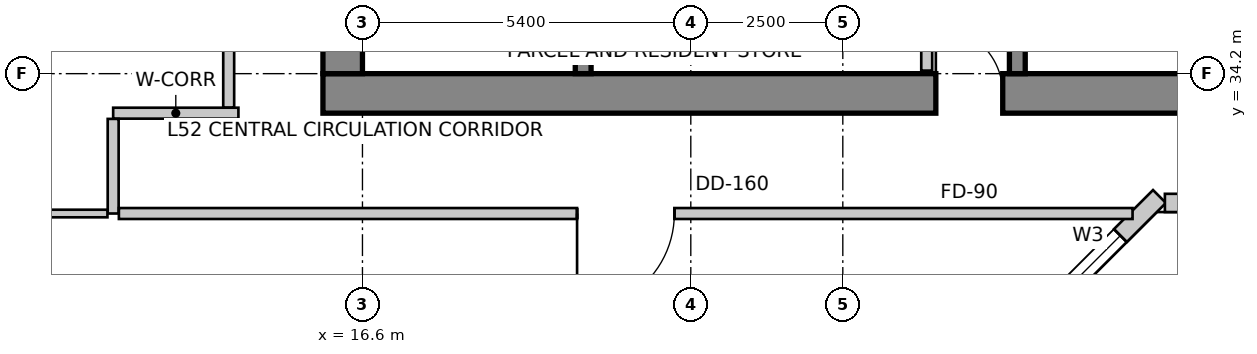
"""IFC4 building model, lengths in metres.
Left out: names, types, materials, properties, quantities, classifications, styles, units other than length and angle.
Written with IfcOpenShell. Run it as: python <this file> out.ifc"""

import sys

from ifc_helpers import new_model, si_unit, direction, frame, frame_2d, origin, place, context, subcontext, project, spatial, rectangle, extrude, source, transform, mapped, element, fill, save


model = new_model("IFC4")
c1 = context("Model", 3, precision=1e-05, world=origin(), true_north=direction((0.0, 1.0)))
c2 = subcontext(c1, "Body", "Model", "MODEL_VIEW")
j1 = project(units=[si_unit("LENGTHUNIT", "METRE"), si_unit("PLANEANGLEUNIT", "RADIAN")], contexts=[c1])
p1 = place(None, origin())
s1 = spatial("IfcSite", under=j1, at=p1, CompositionType="ELEMENT")
p2 = place(p1, origin())
s2 = spatial("IfcBuilding", under=s1, at=p2, CompositionType="ELEMENT")
p3 = place(p2, frame((0.0, 0.0, 207.9)))
s3 = spatial("IfcBuildingStorey", under=s2, at=p3, CompositionType="ELEMENT", Elevation=207.9)
p4 = place(p3, frame((15.95, 33.875, 0.0), z_axis=(0.0, 0.0, 1.0), x_axis=(1.0, 0.0, 0.0)))
e1 = element("IfcWall", 1, at=p4, inside=s3, PredefinedType="SHEAR", context=c2, shape_type="SweptSolid", body=[
    extrude(rectangle(XDim=15.7, YDim=0.65, at=frame_2d((7.85, 0.0))), origin(), (0.0, 0.0, 1.0), 3.5),
])
m1 = source(origin(), c2, "Body", "SweptSolid", [
    extrude(rectangle(XDim=1.1, YDim=2.15, at=frame_2d((0.55, 1.075))), frame((0.0, 0.335, 0.0), z_axis=(0.0, -1.0, 0.0), x_axis=(1.0, 0.0, 0.0)), (0.0, 0.0, 1.0), 0.67),
])
p5 = place(p4, frame((10.08, 0.0, 0.0)))
e2 = element("IfcOpeningElement", 2, at=p5, cuts=e1, PredefinedType="OPENING", context=c2, shape_type="MappedRepresentation", body=[
    mapped(m1, transform((0.0, 0.0, 0.0), scale=1.0)),
])
p6 = place(p3, frame((16.275, 34.2, 0.0), z_axis=(0.0, 0.0, 1.0), x_axis=(0.0, 1.0, 0.0)))
e3 = element("IfcWall", 3, at=p6, inside=s3, PredefinedType="SHEAR", context=c2, shape_type="SweptSolid", body=[
    extrude(rectangle(XDim=11.4, YDim=0.65, at=frame_2d((5.7, 0.0))), origin(), (0.0, 0.0, 1.0), 3.5),
])
p7 = place(p6, frame((7.15, 0.0, 0.0)))
e4 = element("IfcOpeningElement", 4, at=p7, cuts=e3, PredefinedType="OPENING", context=c2, shape_type="MappedRepresentation", body=[
    mapped(m1, transform((0.0, 0.0, 0.0), scale=1.0)),
])
p8 = place(p3, frame((20.23, 34.2, 0.0), z_axis=(0.0, 0.0, 1.0), x_axis=(0.0, 1.0, 0.0)))
e5 = element("IfcWall", 5, at=p8, inside=s3, PredefinedType="SHEAR", context=c2, shape_type="SweptSolid", body=[
    extrude(rectangle(XDim=9.06, YDim=0.26, at=frame_2d((4.53, 0.0))), origin(), (0.0, 0.0, 1.0), 3.5),
])
m2 = source(origin(), c2, "Body", "SweptSolid", [
    extrude(rectangle(XDim=1.1, YDim=2.15, at=frame_2d((0.55, 1.075))), frame((0.0, 0.14, 0.0), z_axis=(0.0, -1.0, 0.0), x_axis=(1.0, 0.0, 0.0)), (0.0, 0.0, 1.0), 0.28),
])
p9 = place(p8, frame((7.45, 0.0, 0.0)))
e6 = element("IfcOpeningElement", 6, at=p9, cuts=e5, PredefinedType="OPENING", context=c2, shape_type="MappedRepresentation", body=[
    mapped(m2, transform((0.0, 0.0, 0.0), scale=1.0)),
])
p10 = place(p3, frame((27.37, 34.2, 0.0), z_axis=(0.0, 0.0, 1.0), x_axis=(0.0, 1.0, 0.0)))
e7 = element("IfcWall", 7, at=p10, inside=s3, PredefinedType="SHEAR", context=c2, shape_type="SweptSolid", body=[
    extrude(rectangle(XDim=9.06, YDim=0.26, at=frame_2d((4.53, 0.0))), origin(), (0.0, 0.0, 1.0), 3.5),
])
p11 = place(p10, frame((7.45, 0.0, 0.0)))
e8 = element("IfcOpeningElement", 8, at=p11, cuts=e7, PredefinedType="OPENING", context=c2, shape_type="MappedRepresentation", body=[
    mapped(m2, transform((0.0, 0.0, 0.0), scale=1.0)),
])
p12 = place(p3, frame((27.652, 30.124, 0.0), z_axis=(0.0, 0.0, 1.0), x_axis=(0.707064797706, 0.707148762175, 0.0)))
e9 = element("IfcWall", 9, at=p12, inside=s3, PredefinedType="SOLIDWALL", context=c2, shape_type="SweptSolid", body=[
    extrude(rectangle(XDim=2.908, YDim=0.3, at=frame_2d((1.454, 0.0))), origin(), (0.0, 0.0, 1.0), 3.2),
])
m3 = source(origin(), c2, "Body", "SweptSolid", [
    extrude(rectangle(XDim=1.5, YDim=1.8, at=frame_2d((0.75, 0.9))), frame((0.0, 0.16, 0.0), z_axis=(0.0, -1.0, 0.0), x_axis=(1.0, 0.0, 0.0)), (0.0, 0.0, 1.0), 0.32),
])
p13 = place(p12, frame((0.498, 0.0, 0.85)))
e10 = element("IfcOpeningElement", 10, at=p13, cuts=e9, PredefinedType="OPENING", context=c2, shape_type="MappedRepresentation", body=[
    mapped(m3, transform((0.0, 0.0, 0.0), scale=1.0)),
])
p14 = place(p3, frame((29.797, 32.074, 0.0), z_axis=(0.0, 0.0, 1.0), x_axis=(1.0, 0.0, 0.0)))
e11 = element("IfcWall", 11, at=p14, inside=s3, PredefinedType="SOLIDWALL", context=c2, shape_type="SweptSolid", body=[
    extrude(rectangle(XDim=0.882, YDim=0.3, at=frame_2d((0.441, 0.0))), origin(), (0.0, 0.0, 1.0), 3.2),
])
p15 = place(p3, frame((13.269, 47.134, 0.0), z_axis=(0.0, 0.0, 1.0), x_axis=(-0.319920776449, -0.947444297464, 0.0)))
e12 = element("IfcWall", 12, at=p15, inside=s3, PredefinedType="SOLIDWALL", context=c2, shape_type="SweptSolid", body=[
    extrude(rectangle(XDim=16.133, YDim=0.3, at=frame_2d((8.067, 0.0))), origin(), (0.0, 0.0, 1.0), 3.2),
])
m4 = source(origin(), c2, "Body", "SweptSolid", [
    extrude(rectangle(XDim=2.4, YDim=2.2, at=frame_2d((1.2, 1.1))), frame((0.0, 0.16, 0.0), z_axis=(0.0, -1.0, 0.0), x_axis=(1.0, 0.0, 0.0)), (0.0, 0.0, 1.0), 0.32),
])
p16 = place(p15, frame((2.363, 0.0, 0.85)))
e13 = element("IfcOpeningElement", 13, at=p16, cuts=e12, PredefinedType="OPENING", context=c2, shape_type="MappedRepresentation", body=[
    mapped(m4, transform((0.0, 0.0, 0.0), scale=1.0)),
])
m5 = source(origin(), c2, "Body", "SweptSolid", [
    extrude(rectangle(XDim=2.1, YDim=2.0, at=frame_2d((1.05, 1.0))), frame((0.0, 0.16, 0.0), z_axis=(0.0, -1.0, 0.0), x_axis=(1.0, 0.0, 0.0)), (0.0, 0.0, 1.0), 0.32),
])
p17 = place(p15, frame((7.41, 0.0, 0.85)))
e14 = element("IfcOpeningElement", 14, at=p17, cuts=e12, PredefinedType="OPENING", context=c2, shape_type="MappedRepresentation", body=[
    mapped(m5, transform((0.0, 0.0, 0.0), scale=1.0)),
])
p18 = place(p15, frame((12.157, 0.0, 0.85)))
e15 = element("IfcOpeningElement", 15, at=p18, cuts=e12, PredefinedType="OPENING", context=c2, shape_type="MappedRepresentation", body=[
    mapped(m4, transform((0.0, 0.0, 0.0), scale=1.0)),
])
p19 = place(p3, frame((8.188, 31.834, 0.0), z_axis=(0.0, 0.0, 1.0), x_axis=(0.202303475707, -0.979322880217, 0.0)))
e16 = element("IfcWall", 16, at=p19, inside=s3, PredefinedType="SOLIDWALL", context=c2, shape_type="SweptSolid", body=[
    extrude(rectangle(XDim=15.766, YDim=0.3, at=frame_2d((7.883, 0.0))), origin(), (0.0, 0.0, 1.0), 3.2),
])
m6 = source(origin(), c2, "Body", "SweptSolid", [
    extrude(rectangle(XDim=1.6, YDim=2.15, at=frame_2d((0.8, 1.075))), frame((0.0, 0.16, 0.0), z_axis=(0.0, -1.0, 0.0), x_axis=(1.0, 0.0, 0.0)), (0.0, 0.0, 1.0), 0.32),
])
p20 = place(p19, frame((9.466, 0.0, 0.0)))
e17 = element("IfcOpeningElement", 17, at=p20, cuts=e16, PredefinedType="OPENING", context=c2, shape_type="MappedRepresentation", body=[
    mapped(m6, transform((0.0, 0.0, 0.0), scale=1.0)),
])
p21 = place(p19, frame((1.487, 0.0, 0.85)))
e18 = element("IfcOpeningElement", 18, at=p21, cuts=e16, PredefinedType="OPENING", context=c2, shape_type="MappedRepresentation", body=[
    mapped(m5, transform((0.0, 0.0, 0.0), scale=1.0)),
])
p22 = place(p19, frame((5.769, 0.0, 0.85)))
e19 = element("IfcOpeningElement", 19, at=p22, cuts=e16, PredefinedType="OPENING", context=c2, shape_type="MappedRepresentation", body=[
    mapped(m4, transform((0.0, 0.0, 0.0), scale=1.0)),
])
p23 = place(p19, frame((11.588, 0.0, 0.85)))
e20 = element("IfcOpeningElement", 20, at=p23, cuts=e16, PredefinedType="OPENING", context=c2, shape_type="MappedRepresentation", body=[
    mapped(m5, transform((0.0, 0.0, 0.0), scale=1.0)),
])
p24 = place(p3, frame((25.88, 35.956, 0.0), z_axis=(0.0, 0.0, 1.0), x_axis=(0.0, -1.0, 0.0)))
e21 = element("IfcWall", 21, at=p24, inside=s3, PredefinedType="PARTITIONING", context=c2, shape_type="SweptSolid", body=[
    extrude(rectangle(XDim=1.706, YDim=0.18, at=frame_2d((0.853, 0.0))), origin(), (0.0, 0.0, 1.0), 2.492),
])
p25 = place(p3, frame((12.5, 33.55, 0.0), z_axis=(0.0, 0.0, 1.0), x_axis=(1.0, 0.0, 0.0)))
e22 = element("IfcWall", 22, at=p25, inside=s3, PredefinedType="PARTITIONING", context=c2, shape_type="SweptSolid", body=[
    extrude(rectangle(XDim=2.06, YDim=0.18, at=frame_2d((1.03, 0.0))), origin(), (0.0, 0.0, 1.0), 3.2),
])
p26 = place(p3, frame((12.5, 31.9, 0.0), z_axis=(0.0, 0.0, 1.0), x_axis=(0.0, 1.0, 0.0)))
e23 = element("IfcWall", 23, at=p26, inside=s3, PredefinedType="PARTITIONING", context=c2, shape_type="SweptSolid", body=[
    extrude(rectangle(XDim=1.556, YDim=0.18, at=frame_2d((0.778, 0.0))), origin(), (0.0, 0.0, 1.0), 2.869),
])
p27 = place(p3, frame((29.265, 31.9, 0.0), z_axis=(0.0, 0.0, 1.0), x_axis=(-1.0, 0.0, 0.0)))
e24 = element("IfcWall", 24, at=p27, inside=s3, PredefinedType="PARTITIONING", context=c2, shape_type="SweptSolid", body=[
    extrude(rectangle(XDim=16.671, YDim=0.18, at=frame_2d((8.335, 0.0))), origin(), (0.0, 0.0, 1.0), 2.869),
])
m7 = source(origin(), c2, "Body", "SweptSolid", [
    extrude(rectangle(XDim=1.6, YDim=2.15, at=frame_2d((0.8, 1.075))), frame((0.0, 0.1, 0.0), z_axis=(0.0, -1.0, 0.0), x_axis=(1.0, 0.0, 0.0)), (0.0, 0.0, 1.0), 0.2),
])
p28 = place(p27, frame((7.536, 0.0, 0.0)))
e25 = element("IfcOpeningElement", 25, at=p28, cuts=e24, PredefinedType="OPENING", context=c2, shape_type="MappedRepresentation", body=[
    mapped(m7, transform((0.0, 0.0, 0.0), scale=1.0)),
])
p29 = place(p3, frame((14.4, 33.644, 0.0), z_axis=(0.0, 0.0, 1.0), x_axis=(0.0, 1.0, 0.0)))
e26 = element("IfcWall", 26, at=p29, inside=s3, PredefinedType="PARTITIONING", context=c2, shape_type="SweptSolid", body=[
    extrude(rectangle(XDim=12.606, YDim=0.18, at=frame_2d((6.303, 0.0))), origin(), (0.0, 0.0, 1.0), 3.2),
])
m8 = source(origin(), c2, "Body", "SweptSolid", [
    extrude(rectangle(XDim=0.9, YDim=2.15, at=frame_2d((0.45, 1.075))), frame((0.0, 0.1, 0.0), z_axis=(0.0, -1.0, 0.0), x_axis=(1.0, 0.0, 0.0)), (0.0, 0.0, 1.0), 0.2),
])
p30 = place(p29, frame((4.399, 0.0, 0.0)))
e27 = element("IfcOpeningElement", 27, at=p30, cuts=e26, PredefinedType="OPENING", context=c2, shape_type="MappedRepresentation", body=[
    mapped(m8, transform((0.0, 0.0, 0.0), scale=1.0)),
])
p31 = place(p3, frame((12.406, 31.9, 0.0), z_axis=(0.0, 0.0, 1.0), x_axis=(-1.0, 0.0, 0.0)))
e28 = element("IfcWall", 28, at=p31, inside=s3, PredefinedType="PARTITIONING", context=c2, shape_type="SweptSolid", body=[
    extrude(rectangle(XDim=4.115, YDim=0.125, at=frame_2d((2.057, 0.0))), origin(), (0.0, 0.0, 1.0), 2.492),
])
m9 = source(origin(), c2, "Body", "SweptSolid", [
    extrude(rectangle(XDim=1.5, YDim=1.8, at=frame_2d((0.75, 0.9))), frame((0.0, -0.015, 0.0), z_axis=(0.0, -1.0, 0.0), x_axis=(1.0, 0.0, 0.0)), (0.0, 0.0, 1.0), 0.06),
])
p32 = place(p13, origin())
e29 = element("IfcWindow", 29, at=p32, inside=s3, PartitioningType="SINGLE_PANEL", PredefinedType="WINDOW", context=c2, shape_type="MappedRepresentation", body=[
    mapped(m9, transform((0.0, 0.0, 0.0), scale=1.0)),
])
fill(e10, e29)
m10 = source(origin(), c2, "Body", "SweptSolid", [
    extrude(rectangle(XDim=1.1, YDim=2.15, at=frame_2d((0.55, 1.075))), frame((0.0, 0.025, 0.0), z_axis=(0.0, -1.0, 0.0), x_axis=(1.0, 0.0, 0.0)), (0.0, 0.0, 1.0), 0.05),
])
p33 = place(p5, origin())
e30 = element("IfcDoor", 30, at=p33, inside=s3, OperationType="SINGLE_SWING_LEFT", PredefinedType="DOOR", context=c2, shape_type="MappedRepresentation", body=[
    mapped(m10, transform((0.0, 0.0, 0.0), scale=1.0)),
])
fill(e2, e30)
m11 = source(origin(), c2, "Body", "SweptSolid", [
    extrude(rectangle(XDim=1.6, YDim=2.15, at=frame_2d((0.8, 1.075))), frame((0.0, 0.025, 0.0), z_axis=(0.0, -1.0, 0.0), x_axis=(1.0, 0.0, 0.0)), (0.0, 0.0, 1.0), 0.05),
])
p34 = place(p28, origin())
e31 = element("IfcDoor", 31, at=p34, inside=s3, OperationType="SINGLE_SWING_RIGHT", PredefinedType="DOOR", context=c2, shape_type="MappedRepresentation", body=[
    mapped(m11, transform((0.0, 0.0, 0.0), scale=1.0)),
])
fill(e25, e31)
save(model, sys.argv[1])
